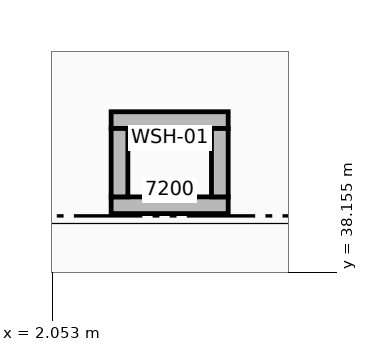
"""IFC4 building model, lengths in metres.
Left out: names, types, materials, properties, quantities, classifications, styles, units other than length and angle.
Written with IfcOpenShell. Run it as: python <this file> out.ifc"""

import sys

from ifc_helpers import new_model, si_unit, direction, frame, frame_2d, origin, place, context, subcontext, project, spatial, rectangle, extrude, element, save


model = new_model("IFC4")
c1 = context("Model", 3, precision=1e-05, world=origin(), true_north=direction((0.0, 1.0)))
c2 = subcontext(c1, "Body", "Model", "MODEL_VIEW")
j1 = project(units=[si_unit("LENGTHUNIT", "METRE"), si_unit("PLANEANGLEUNIT", "RADIAN")], contexts=[c1])
p1 = place(None, origin())
s1 = spatial("IfcSite", under=j1, at=p1, CompositionType="ELEMENT")
p2 = place(p1, origin())
s2 = spatial("IfcBuilding", under=s1, at=p2, CompositionType="ELEMENT")
p3 = place(p2, frame((0.0, 0.0, 4.5)))
s3 = spatial("IfcBuildingStorey", under=s2, at=p3, CompositionType="ELEMENT", Elevation=4.5)
for number, where, z_axis, x_axis in (
    (1, (2.83, 39.04, 0.0), (0.0, 0.0, 1.0), (1.0, 0.0, 0.0)),
    (2, (2.83, 40.16, 0.0), (0.0, 0.0, 1.0), (1.0, 0.0, 0.0)),
):
    element("IfcWall", number, at=place(p3, frame(where, z_axis=z_axis, x_axis=x_axis)), inside=s3, PredefinedType="STANDARD", context=c2, shape_type="SweptSolid", body=[
        extrude(rectangle(XDim=1.54, YDim=0.22, at=frame_2d((0.77, 0.0))), origin(), (0.0, 0.0, 1.0), 3.26),
    ])
for number, where, z_axis, x_axis in (
    (3, (2.94, 39.15, 0.0), (0.0, 0.0, 1.0), (0.0, 1.0, 0.0)),
    (4, (4.26, 39.15, 0.0), (0.0, 0.0, 1.0), (0.0, 1.0, 0.0)),
):
    element("IfcWall", number, at=place(p3, frame(where, z_axis=z_axis, x_axis=x_axis)), inside=s3, PredefinedType="STANDARD", context=c2, shape_type="SweptSolid", body=[
        extrude(rectangle(XDim=0.9, YDim=0.22, at=frame_2d((0.45, 0.0))), origin(), (0.0, 0.0, 1.0), 3.26),
    ])
save(model, sys.argv[1])
